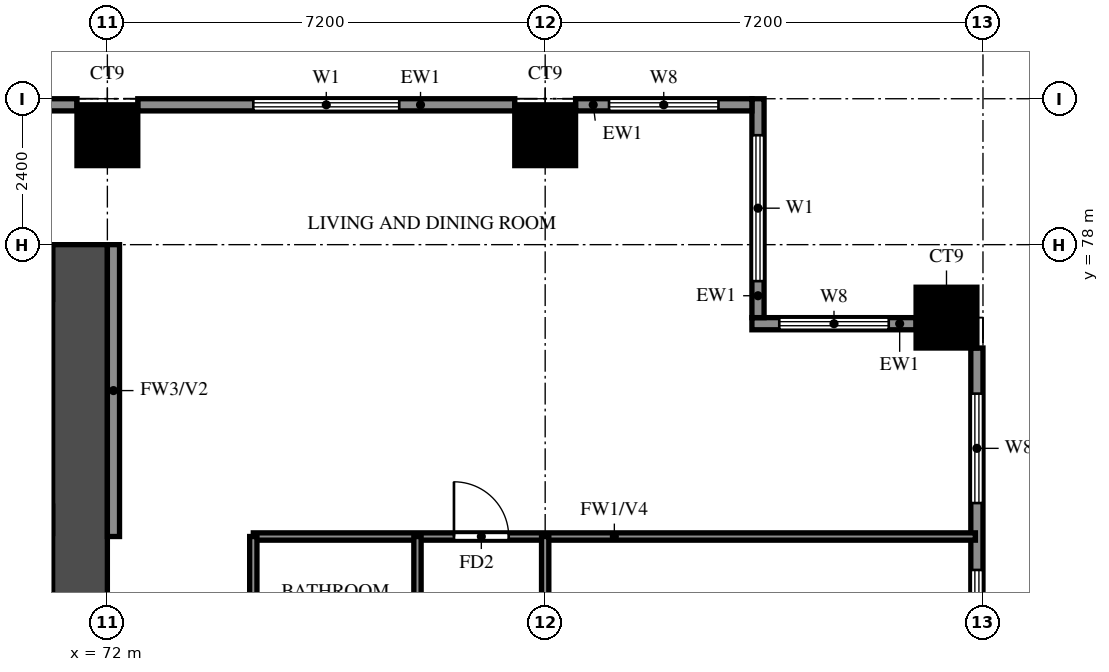
"""IFC4 building model, lengths in metres.
Left out: names, types, materials, properties, quantities, classifications, styles, units other than length and angle.
Written with IfcOpenShell. Run it as: python <this file> out.ifc"""

import sys

from ifc_helpers import new_model, si_unit, direction, frame, frame_2d, origin, origin_2d, place, context, subcontext, project, spatial, rectangle, extrude, source, transform, mapped, element, fill, save


model = new_model("IFC4")
c1 = context("Model", 3, precision=1e-05, world=origin(), true_north=direction((0.0, 1.0)))
c2 = subcontext(c1, "Body", "Model", "MODEL_VIEW")
j1 = project(units=[si_unit("LENGTHUNIT", "METRE"), si_unit("PLANEANGLEUNIT", "RADIAN")], contexts=[c1])
p1 = place(None, origin())
s1 = spatial("IfcSite", under=j1, at=p1, CompositionType="ELEMENT")
p2 = place(p1, origin())
s2 = spatial("IfcBuilding", under=s1, at=p2, CompositionType="ELEMENT")
p3 = place(p2, frame((0.0, 0.0, 79.5)))
s3 = spatial("IfcBuildingStorey", under=s2, at=p3, CompositionType="ELEMENT", Elevation=79.5)
m1 = source(origin(), c2, "Body", "SweptSolid", [
    extrude(rectangle(XDim=1.0, YDim=1.0, at=origin_2d()), origin(), (0.0, 0.0, 1.0), 3.18),
])
for number, where, z_axis, x_axis in (
    (1, (85.8, 76.8, 0.0), (0.0, 0.0, 1.0), (1.0, 0.0, 0.0)),
    (2, (72.0, 79.8, 0.0), (0.0, 0.0, 1.0), (1.0, 0.0, 0.0)),
    (3, (79.2, 79.8, 0.0), (0.0, 0.0, 1.0), (1.0, 0.0, 0.0)),
):
    element("IfcColumn", number, at=place(p3, frame(where, z_axis=z_axis, x_axis=x_axis)), inside=s3, PredefinedType="COLUMN", context=c2, shape_type="MappedRepresentation", body=[
        mapped(m1, transform((0.0, 0.0, 0.0))),
    ])
p4 = place(p3, frame((71.55, 66.0, 0.0), z_axis=(0.0, 0.0, 1.0), x_axis=(0.0, 1.0, 0.0)))
e4 = element("IfcWall", 4, at=p4, inside=s3, PredefinedType="SHEAR", context=c2, shape_type="SweptSolid", body=[
    extrude(rectangle(XDim=12.0, YDim=0.9, at=frame_2d((6.0, 0.0))), origin(), (0.0, 0.0, 1.0), 3.18),
])
p5 = place(p3, frame((29.7, 77.55, 0.0), z_axis=(0.0, 0.0, 1.0), x_axis=(1.0, 0.0, 0.0)))
e5 = element("IfcWall", 5, at=p5, inside=s3, PredefinedType="SHEAR", context=c2, shape_type="SweptSolid", body=[
    extrude(rectangle(XDim=41.4, YDim=0.9, at=frame_2d((20.7, 0.0))), origin(), (0.0, 0.0, 1.0), 3.18),
])
p6 = place(p3, frame((86.3, 70.1, 0.0), z_axis=(0.0, 0.0, 1.0), x_axis=(0.0, 1.0, 0.0)))
e6 = element("IfcWall", 6, at=p6, inside=s3, PredefinedType="SOLIDWALL", context=c2, shape_type="SweptSolid", body=[
    extrude(rectangle(XDim=6.2, YDim=0.2, at=frame_2d((3.1, 0.0))), origin(), (0.0, 0.0, 1.0), 3.18),
])
p7 = place(p6, frame((0.75, 0.0, 0.6)))
e7 = element("IfcOpeningElement", 7, at=p7, cuts=e6, PredefinedType="OPENING", context=c2, shape_type="SweptSolid", body=[
    extrude(rectangle(XDim=1.8, YDim=2.4, at=frame_2d((0.9, 1.2))), frame((0.0, 0.11, 0.0), z_axis=(0.0, -1.0, 0.0), x_axis=(1.0, 0.0, 0.0)), (0.0, 0.0, 1.0), 0.22),
])
p8 = place(p6, frame((3.65, 0.0, 0.6)))
e8 = element("IfcOpeningElement", 8, at=p8, cuts=e6, PredefinedType="OPENING", context=c2, shape_type="SweptSolid", body=[
    extrude(rectangle(XDim=1.8, YDim=2.4, at=frame_2d((0.9, 1.2))), frame((0.0, 0.11, 0.0), z_axis=(0.0, -1.0, 0.0), x_axis=(1.0, 0.0, 0.0)), (0.0, 0.0, 1.0), 0.22),
])
p9 = place(p3, frame((85.3, 76.7, 0.0), z_axis=(0.0, 0.0, 1.0), x_axis=(-1.0, 0.0, 0.0)))
e9 = element("IfcWall", 9, at=p9, inside=s3, PredefinedType="SOLIDWALL", context=c2, shape_type="SweptSolid", body=[
    extrude(rectangle(XDim=2.7, YDim=0.2, at=frame_2d((1.35, 0.0))), origin(), (0.0, 0.0, 1.0), 3.18),
])
p10 = place(p9, frame((0.45, 0.0, 0.6)))
e10 = element("IfcOpeningElement", 10, at=p10, cuts=e9, PredefinedType="OPENING", context=c2, shape_type="SweptSolid", body=[
    extrude(rectangle(XDim=1.8, YDim=2.4, at=frame_2d((0.9, 1.2))), frame((0.0, 0.11, 0.0), z_axis=(0.0, -1.0, 0.0), x_axis=(1.0, 0.0, 0.0)), (0.0, 0.0, 1.0), 0.22),
])
p11 = place(p3, frame((82.7, 76.8, 0.0), z_axis=(0.0, 0.0, 1.0), x_axis=(0.0, 1.0, 0.0)))
e11 = element("IfcWall", 11, at=p11, inside=s3, PredefinedType="SOLIDWALL", context=c2, shape_type="SweptSolid", body=[
    extrude(rectangle(XDim=3.6, YDim=0.2, at=frame_2d((1.8, 0.0))), origin(), (0.0, 0.0, 1.0), 3.18),
])
p12 = place(p11, frame((0.6, 0.0, 0.6)))
e12 = element("IfcOpeningElement", 12, at=p12, cuts=e11, PredefinedType="OPENING", context=c2, shape_type="SweptSolid", body=[
    extrude(rectangle(XDim=2.4, YDim=2.4, at=frame_2d((1.2, 1.2))), frame((0.0, 0.11, 0.0), z_axis=(0.0, -1.0, 0.0), x_axis=(1.0, 0.0, 0.0)), (0.0, 0.0, 1.0), 0.22),
])
p13 = place(p3, frame((82.6, 80.3, 0.0), z_axis=(0.0, 0.0, 1.0), x_axis=(-1.0, 0.0, 0.0)))
e13 = element("IfcWall", 13, at=p13, inside=s3, PredefinedType="SOLIDWALL", context=c2, shape_type="SweptSolid", body=[
    extrude(rectangle(XDim=2.9, YDim=0.2, at=frame_2d((1.45, 0.0))), origin(), (0.0, 0.0, 1.0), 3.18),
])
p14 = place(p13, frame((0.55, 0.0, 0.6)))
e14 = element("IfcOpeningElement", 14, at=p14, cuts=e13, PredefinedType="OPENING", context=c2, shape_type="SweptSolid", body=[
    extrude(rectangle(XDim=1.8, YDim=2.4, at=frame_2d((0.9, 1.2))), frame((0.0, 0.11, 0.0), z_axis=(0.0, -1.0, 0.0), x_axis=(1.0, 0.0, 0.0)), (0.0, 0.0, 1.0), 0.22),
])
p15 = place(p3, frame((78.7, 80.3, 0.0), z_axis=(0.0, 0.0, 1.0), x_axis=(-1.0, 0.0, 0.0)))
e15 = element("IfcWall", 15, at=p15, inside=s3, PredefinedType="SOLIDWALL", context=c2, shape_type="SweptSolid", body=[
    extrude(rectangle(XDim=6.2, YDim=0.2, at=frame_2d((3.1, 0.0))), origin(), (0.0, 0.0, 1.0), 3.18),
])
p16 = place(p15, frame((1.9, 0.0, 0.6)))
e16 = element("IfcOpeningElement", 16, at=p16, cuts=e15, PredefinedType="OPENING", context=c2, shape_type="SweptSolid", body=[
    extrude(rectangle(XDim=2.4, YDim=2.4, at=frame_2d((1.2, 1.2))), frame((0.0, 0.11, 0.0), z_axis=(0.0, -1.0, 0.0), x_axis=(1.0, 0.0, 0.0)), (0.0, 0.0, 1.0), 0.22),
])
p17 = place(p3, frame((71.5, 80.3, 0.0), z_axis=(0.0, 0.0, 1.0), x_axis=(-1.0, 0.0, 0.0)))
e17 = element("IfcWall", 17, at=p17, inside=s3, PredefinedType="SOLIDWALL", context=c2, shape_type="SweptSolid", body=[
    extrude(rectangle(XDim=6.2, YDim=0.2, at=frame_2d((3.1, 0.0))), origin(), (0.0, 0.0, 1.0), 3.18),
])
p18 = place(p3, frame((72.1, 73.2, 0.0), z_axis=(0.0, 0.0, 1.0), x_axis=(0.0, 1.0, 0.0)))
e18 = element("IfcWall", 18, at=p18, inside=s3, PredefinedType="SOLIDWALL", context=c2, shape_type="SweptSolid", body=[
    extrude(rectangle(XDim=4.8, YDim=0.2, at=frame_2d((2.4, 0.0))), origin(), (0.0, 0.0, 1.0), 3.18),
])
p19 = place(p3, frame((74.4, 73.2, 0.0), z_axis=(0.0, 0.0, 1.0), x_axis=(1.0, 0.0, 0.0)))
e19 = element("IfcWall", 19, at=p19, inside=s3, PredefinedType="PARTITIONING", context=c2, shape_type="SweptSolid", body=[
    extrude(rectangle(XDim=11.875, YDim=0.12, at=frame_2d((5.938, 0.0))), origin(), (0.0, 0.0, 1.0), 2.28),
])
p20 = place(p19, frame((3.3, 0.0, 0.0)))
e20 = element("IfcOpeningElement", 20, at=p20, cuts=e19, PredefinedType="OPENING", context=c2, shape_type="SweptSolid", body=[
    extrude(rectangle(XDim=0.9, YDim=2.1, at=frame_2d((0.45, 1.05))), frame((0.0, 0.07, 0.0), z_axis=(0.0, -1.0, 0.0), x_axis=(1.0, 0.0, 0.0)), (0.0, 0.0, 1.0), 0.14),
])
p21 = place(p3, frame((74.4, 69.62, 0.0), z_axis=(0.0, 0.0, 1.0), x_axis=(0.0, 1.0, 0.0)))
e21 = element("IfcWall", 21, at=p21, inside=s3, PredefinedType="PARTITIONING", context=c2, shape_type="SweptSolid", body=[
    extrude(rectangle(XDim=3.58, YDim=0.12, at=frame_2d((1.79, 0.0))), origin(), (0.0, 0.0, 1.0), 3.18),
])
p22 = place(p3, frame((77.1, 64.8, 0.0), z_axis=(0.0, 0.0, 1.0), x_axis=(0.0, 1.0, 0.0)))
e22 = element("IfcWall", 22, at=p22, inside=s3, PredefinedType="PARTITIONING", context=c2, shape_type="SweptSolid", body=[
    extrude(rectangle(XDim=8.4, YDim=0.12, at=frame_2d((4.2, 0.0))), origin(), (0.0, 0.0, 1.0), 3.18),
])
p23 = place(p22, frame((1.875, 0.0, 0.0)))
e23 = element("IfcOpeningElement", 23, at=p23, cuts=e22, PredefinedType="OPENING", context=c2, shape_type="SweptSolid", body=[
    extrude(rectangle(XDim=0.9, YDim=2.1, at=frame_2d((0.45, 1.05))), frame((0.0, 0.07, 0.0), z_axis=(0.0, -1.0, 0.0), x_axis=(1.0, 0.0, 0.0)), (0.0, 0.0, 1.0), 0.14),
])
p24 = place(p22, frame((6.125, 0.0, 0.0)))
e24 = element("IfcOpeningElement", 24, at=p24, cuts=e22, PredefinedType="OPENING", context=c2, shape_type="SweptSolid", body=[
    extrude(rectangle(XDim=0.8, YDim=2.1, at=frame_2d((0.4, 1.05))), frame((0.0, 0.07, 0.0), z_axis=(0.0, -1.0, 0.0), x_axis=(1.0, 0.0, 0.0)), (0.0, 0.0, 1.0), 0.14),
])
p25 = place(p3, frame((79.2, 48.125, 0.0), z_axis=(0.0, 0.0, 1.0), x_axis=(0.0, 1.0, 0.0)))
e25 = element("IfcWall", 25, at=p25, inside=s3, PredefinedType="PARTITIONING", context=c2, shape_type="SweptSolid", body=[
    extrude(rectangle(XDim=25.075, YDim=0.12, at=frame_2d((12.538, 0.0))), origin(), (0.0, 0.0, 1.0), 3.18),
])
p26 = place(p25, frame((2.788, 0.0, 0.0)))
e26 = element("IfcOpeningElement", 26, at=p26, cuts=e25, PredefinedType="OPENING", context=c2, shape_type="SweptSolid", body=[
    extrude(rectangle(XDim=1.5, YDim=2.1, at=frame_2d((0.75, 1.05))), frame((0.0, 0.07, 0.0), z_axis=(0.0, -1.0, 0.0), x_axis=(1.0, 0.0, 0.0)), (0.0, 0.0, 1.0), 0.14),
])
p27 = place(p25, frame((8.425, 0.0, 0.0)))
e27 = element("IfcOpeningElement", 27, at=p27, cuts=e25, PredefinedType="OPENING", context=c2, shape_type="SweptSolid", body=[
    extrude(rectangle(XDim=0.9, YDim=2.1, at=frame_2d((0.45, 1.05))), frame((0.0, 0.07, 0.0), z_axis=(0.0, -1.0, 0.0), x_axis=(1.0, 0.0, 0.0)), (0.0, 0.0, 1.0), 0.14),
])
p28 = place(p25, frame((12.025, 0.0, 0.0)))
e28 = element("IfcOpeningElement", 28, at=p28, cuts=e25, PredefinedType="OPENING", context=c2, shape_type="SweptSolid", body=[
    extrude(rectangle(XDim=0.9, YDim=2.1, at=frame_2d((0.45, 1.05))), frame((0.0, 0.07, 0.0), z_axis=(0.0, -1.0, 0.0), x_axis=(1.0, 0.0, 0.0)), (0.0, 0.0, 1.0), 0.14),
])
p29 = place(p25, frame((15.625, 0.0, 0.0)))
e29 = element("IfcOpeningElement", 29, at=p29, cuts=e25, PredefinedType="OPENING", context=c2, shape_type="SweptSolid", body=[
    extrude(rectangle(XDim=0.9, YDim=2.1, at=frame_2d((0.45, 1.05))), frame((0.0, 0.07, 0.0), z_axis=(0.0, -1.0, 0.0), x_axis=(1.0, 0.0, 0.0)), (0.0, 0.0, 1.0), 0.14),
])
p30 = place(p25, frame((19.225, 0.0, 0.0)))
e30 = element("IfcOpeningElement", 30, at=p30, cuts=e25, PredefinedType="OPENING", context=c2, shape_type="SweptSolid", body=[
    extrude(rectangle(XDim=0.9, YDim=2.1, at=frame_2d((0.45, 1.05))), frame((0.0, 0.07, 0.0), z_axis=(0.0, -1.0, 0.0), x_axis=(1.0, 0.0, 0.0)), (0.0, 0.0, 1.0), 0.14),
])
p31 = place(p25, frame((22.825, 0.0, 0.0)))
e31 = element("IfcOpeningElement", 31, at=p31, cuts=e25, PredefinedType="OPENING", context=c2, shape_type="SweptSolid", body=[
    extrude(rectangle(XDim=0.9, YDim=2.1, at=frame_2d((0.45, 1.05))), frame((0.0, 0.07, 0.0), z_axis=(0.0, -1.0, 0.0), x_axis=(1.0, 0.0, 0.0)), (0.0, 0.0, 1.0), 0.14),
])
p32 = place(p7, origin())
e32 = element("IfcWindow", 32, at=p32, inside=s3, PartitioningType="DOUBLE_PANEL_VERTICAL", PredefinedType="WINDOW", context=c2, shape_type="SweptSolid", body=[
    extrude(rectangle(XDim=1.8, YDim=2.4, at=frame_2d((0.9, 1.2))), frame((0.0, 0.03, 0.0), z_axis=(0.0, -1.0, 0.0), x_axis=(1.0, 0.0, 0.0)), (0.0, 0.0, 1.0), 0.06),
])
fill(e7, e32)
p33 = place(p8, origin())
e33 = element("IfcWindow", 33, at=p33, inside=s3, PartitioningType="DOUBLE_PANEL_VERTICAL", PredefinedType="WINDOW", context=c2, shape_type="SweptSolid", body=[
    extrude(rectangle(XDim=1.8, YDim=2.4, at=frame_2d((0.9, 1.2))), frame((0.0, 0.03, 0.0), z_axis=(0.0, -1.0, 0.0), x_axis=(1.0, 0.0, 0.0)), (0.0, 0.0, 1.0), 0.06),
])
fill(e8, e33)
p34 = place(p10, origin())
e34 = element("IfcWindow", 34, at=p34, inside=s3, PartitioningType="DOUBLE_PANEL_VERTICAL", PredefinedType="WINDOW", context=c2, shape_type="SweptSolid", body=[
    extrude(rectangle(XDim=1.8, YDim=2.4, at=frame_2d((0.9, 1.2))), frame((0.0, 0.03, 0.0), z_axis=(0.0, -1.0, 0.0), x_axis=(1.0, 0.0, 0.0)), (0.0, 0.0, 1.0), 0.06),
])
fill(e10, e34)
p35 = place(p12, origin())
e35 = element("IfcWindow", 35, at=p35, inside=s3, PartitioningType="DOUBLE_PANEL_VERTICAL", PredefinedType="WINDOW", context=c2, shape_type="SweptSolid", body=[
    extrude(rectangle(XDim=2.4, YDim=2.4, at=frame_2d((1.2, 1.2))), frame((0.0, 0.03, 0.0), z_axis=(0.0, -1.0, 0.0), x_axis=(1.0, 0.0, 0.0)), (0.0, 0.0, 1.0), 0.06),
])
fill(e12, e35)
p36 = place(p14, origin())
e36 = element("IfcWindow", 36, at=p36, inside=s3, PartitioningType="DOUBLE_PANEL_VERTICAL", PredefinedType="WINDOW", context=c2, shape_type="SweptSolid", body=[
    extrude(rectangle(XDim=1.8, YDim=2.4, at=frame_2d((0.9, 1.2))), frame((0.0, 0.03, 0.0), z_axis=(0.0, -1.0, 0.0), x_axis=(1.0, 0.0, 0.0)), (0.0, 0.0, 1.0), 0.06),
])
fill(e14, e36)
p37 = place(p16, origin())
e37 = element("IfcWindow", 37, at=p37, inside=s3, PartitioningType="DOUBLE_PANEL_VERTICAL", PredefinedType="WINDOW", context=c2, shape_type="SweptSolid", body=[
    extrude(rectangle(XDim=2.4, YDim=2.4, at=frame_2d((1.2, 1.2))), frame((0.0, 0.03, 0.0), z_axis=(0.0, -1.0, 0.0), x_axis=(1.0, 0.0, 0.0)), (0.0, 0.0, 1.0), 0.06),
])
fill(e16, e37)
p38 = place(p20, origin())
e38 = element("IfcDoor", 38, at=p38, inside=s3, OperationType="SINGLE_SWING_LEFT", PredefinedType="DOOR", context=c2, shape_type="SweptSolid", body=[
    extrude(rectangle(XDim=0.9, YDim=2.1, at=frame_2d((0.45, 1.05))), frame((0.0, 0.025, 0.0), z_axis=(0.0, -1.0, 0.0), x_axis=(1.0, 0.0, 0.0)), (0.0, 0.0, 1.0), 0.05),
])
fill(e20, e38)
save(model, sys.argv[1])
